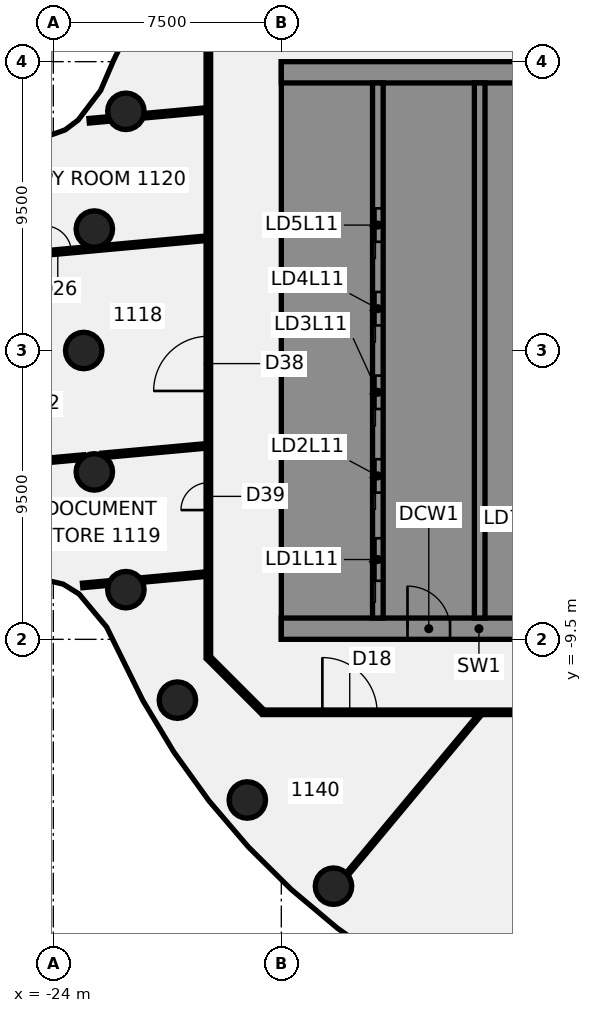
"""IFC4 building model, lengths in metres.
Left out: names, types, materials, properties, quantities, classifications, styles, units other than length and angle.
Written with IfcOpenShell. Run it as: python <this file> out.ifc"""

import sys

from ifc_helpers import new_model, si_unit, direction, frame, frame_2d, origin, origin_2d, place, context, subcontext, project, spatial, polyline, rectangle, circle, outline, extrude, element, fill, save


model = new_model("IFC4")
c1 = context("Model", 3, precision=1e-05, world=origin(), true_north=direction((0.0, 1.0)))
c2 = subcontext(c1, "Body", "Model", "MODEL_VIEW")
j1 = project(units=[si_unit("LENGTHUNIT", "METRE"), si_unit("PLANEANGLEUNIT", "RADIAN")], contexts=[c1])
p1 = place(None, origin())
s1 = spatial("IfcSite", under=j1, at=p1, CompositionType="ELEMENT")
p2 = place(p1, origin())
s2 = spatial("IfcBuilding", under=s1, at=p2, CompositionType="ELEMENT")
p3 = place(p2, frame((0.0, 0.0, 52.75)))
s3 = spatial("IfcBuildingStorey", under=s2, at=p3, CompositionType="ELEMENT", Elevation=52.75)
for number, where, z_axis, x_axis in (
    (1, (-21.613, 7.866, -0.14), (0.0, 0.0, 1.0), (1.0, 0.0, 0.0)),
    (2, (-22.651, 3.994, -0.14), (0.0, 0.0, 1.0), (1.0, 0.0, 0.0)),
    (3, (-23.0, 0.0, -0.14), (0.0, 0.0, 1.0), (1.0, 0.0, 0.0)),
    (4, (-22.651, -3.994, -0.14), (0.0, 0.0, 1.0), (1.0, 0.0, 0.0)),
    (5, (-21.613, -7.866, -0.14), (0.0, 0.0, 1.0), (1.0, 0.0, 0.0)),
    (6, (-19.919, -11.5, -0.14), (0.0, 0.0, 1.0), (1.0, 0.0, 0.0)),
    (7, (-17.619, -14.784, -0.14), (0.0, 0.0, 1.0), (1.0, 0.0, 0.0)),
    (8, (-14.784, -17.619, -0.14), (0.0, 0.0, 1.0), (1.0, 0.0, 0.0)),
):
    element("IfcColumn", number, at=place(p3, frame(where, z_axis=z_axis, x_axis=x_axis)), inside=s3, PredefinedType="COLUMN", context=c2, shape_type="SweptSolid", body=[
        extrude(circle(Radius=0.6, at=origin_2d()), origin(), (0.0, 0.0, 1.0), 3.75),
    ])
p4 = place(p3, frame((-18.872, -10.128, 0.0), z_axis=(0.0, 0.0, 1.0), x_axis=(0.707106781187, -0.707106781187, 0.0)))
e9 = element("IfcWall", 9, at=p4, inside=s3, PredefinedType="PARTITIONING", context=c2, shape_type="SweptSolid", body=[
    extrude(rectangle(XDim=2.465, YDim=0.15, at=frame_2d((1.232, 0.0))), origin(), (0.0, 0.0, 1.0), 3.01),
])
p5 = place(p3, frame((-17.1, -11.9, 0.0), z_axis=(0.0, 0.0, 1.0), x_axis=(1.0, 0.0, 0.0)))
e10 = element("IfcWall", 10, at=p5, inside=s3, PredefinedType="PARTITIONING", context=c2, shape_type="SweptSolid", body=[
    extrude(rectangle(XDim=34.165, YDim=0.15, at=frame_2d((17.083, 0.0))), origin(), (0.0, 0.0, 1.0), 3.01),
])
p6 = place(p5, frame((15.312, 0.0, 0.0)))
e11 = element("IfcOpeningElement", 11, at=p6, cuts=e10, PredefinedType="OPENING", context=c2, shape_type="SweptSolid", body=[
    extrude(rectangle(XDim=1.8, YDim=2.1, at=frame_2d((0.9, 1.05))), frame((0.0, 0.085, 0.0), z_axis=(0.0, -1.0, 0.0), x_axis=(1.0, 0.0, 0.0)), (0.0, 0.0, 1.0), 0.17),
])
p7 = place(p5, frame((1.95, 0.0, 0.0)))
e12 = element("IfcOpeningElement", 12, at=p7, cuts=e10, PredefinedType="OPENING", context=c2, shape_type="SweptSolid", body=[
    extrude(rectangle(XDim=1.8, YDim=2.1, at=frame_2d((0.9, 1.05))), frame((0.0, 0.085, 0.0), z_axis=(0.0, -1.0, 0.0), x_axis=(1.0, 0.0, 0.0)), (0.0, 0.0, 1.0), 0.17),
])
p8 = place(p5, frame((27.558, 0.0, 0.0)))
e13 = element("IfcOpeningElement", 13, at=p8, cuts=e10, PredefinedType="OPENING", context=c2, shape_type="SweptSolid", body=[
    extrude(rectangle(XDim=1.8, YDim=2.1, at=frame_2d((0.9, 1.05))), frame((0.0, 0.085, 0.0), z_axis=(0.0, -1.0, 0.0), x_axis=(1.0, 0.0, 0.0)), (0.0, 0.0, 1.0), 0.17),
])
p9 = place(p3, frame((-26.0, 3.049, 0.0), z_axis=(0.0, 0.0, 1.0), x_axis=(0.995841773556, 0.091099736772, 0.0)))
e14 = element("IfcWall", 14, at=p9, inside=s3, PredefinedType="PARTITIONING", context=c2, shape_type="SweptSolid", body=[
    extrude(rectangle(XDim=7.064, YDim=0.15, at=frame_2d((3.532, 0.0))), origin(), (0.0, 0.0, 1.0), 3.01),
])
p10 = place(p9, frame((1.705, 0.0, 0.0)))
e15 = element("IfcOpeningElement", 15, at=p10, cuts=e14, PredefinedType="OPENING", context=c2, shape_type="SweptSolid", body=[
    extrude(rectangle(XDim=0.9, YDim=2.1, at=frame_2d((0.45, 1.05))), frame((0.0, 0.085, 0.0), z_axis=(0.0, -1.0, 0.0), x_axis=(1.0, 0.0, 0.0)), (0.0, 0.0, 1.0), 0.17),
])
p11 = place(p3, frame((-25.38, -3.723, 0.0), z_axis=(0.0, 0.0, 1.0), x_axis=(0.995847961982, 0.091032063676, 0.0)))
e16 = element("IfcWall", 16, at=p11, inside=s3, PredefinedType="PARTITIONING", context=c2, shape_type="SweptSolid", body=[
    extrude(rectangle(XDim=2.395, YDim=0.15, at=frame_2d((1.198, 0.0))), origin(), (0.0, 0.0, 1.0), 3.01),
])
p12 = place(p3, frame((-22.4, -3.451, 0.0), z_axis=(0.0, 0.0, 1.0), x_axis=(0.995850755629, 0.091001497317, 0.0)))
e17 = element("IfcWall", 17, at=p12, inside=s3, PredefinedType="PARTITIONING", context=c2, shape_type="SweptSolid", body=[
    extrude(rectangle(XDim=3.45, YDim=0.15, at=frame_2d((1.725, 0.0))), origin(), (0.0, 0.0, 1.0), 3.01),
])
p13 = place(p3, frame((-23.036, -7.727, 0.0), z_axis=(0.0, 0.0, 1.0), x_axis=(0.995831241369, 0.091214794378, 0.0)))
e18 = element("IfcWall", 18, at=p13, inside=s3, PredefinedType="PARTITIONING", context=c2, shape_type="SweptSolid", body=[
    extrude(rectangle(XDim=0.875, YDim=0.15, at=frame_2d((0.438, 0.0))), origin(), (0.0, 0.0, 1.0), 3.01),
])
p14 = place(p3, frame((-21.097, -7.549, 0.0), z_axis=(0.0, 0.0, 1.0), x_axis=(0.995831293588, 0.091214224281, 0.0)))
e19 = element("IfcWall", 19, at=p14, inside=s3, PredefinedType="PARTITIONING", context=c2, shape_type="SweptSolid", body=[
    extrude(rectangle(XDim=2.141, YDim=0.15, at=frame_2d((1.071, 0.0))), origin(), (0.0, 0.0, 1.0), 3.01),
])
p15 = place(p3, frame((-22.822, 7.556, 0.0), z_axis=(0.0, 0.0, 1.0), x_axis=(0.995860226183, 0.090897799237, 0.0)))
e20 = element("IfcWall", 20, at=p15, inside=s3, PredefinedType="PARTITIONING", context=c2, shape_type="SweptSolid", body=[
    extrude(rectangle(XDim=0.669, YDim=0.15, at=frame_2d((0.334, 0.0))), origin(), (0.0, 0.0, 1.0), 3.01),
])
p16 = place(p3, frame((-21.042, 7.719, 0.0), z_axis=(0.0, 0.0, 1.0), x_axis=(0.995837392729, 0.091147612376, 0.0)))
e21 = element("IfcWall", 21, at=p16, inside=s3, PredefinedType="PARTITIONING", context=c2, shape_type="SweptSolid", body=[
    extrude(rectangle(XDim=2.087, YDim=0.15, at=frame_2d((1.043, 0.0))), origin(), (0.0, 0.0, 1.0), 3.01),
])
p17 = place(p3, frame((-14.342, -17.229, 0.0), z_axis=(0.0, 0.0, 1.0), x_axis=(0.639768706711, 0.768567499907, 0.0)))
e22 = element("IfcWall", 22, at=p17, inside=s3, PredefinedType="PARTITIONING", context=c2, shape_type="SweptSolid", body=[
    extrude(rectangle(XDim=6.818, YDim=0.1, at=frame_2d((3.409, 0.0))), origin(), (0.0, 0.0, 1.0), 3.01),
])
p18 = place(p3, frame((-18.9, -10.1, 0.0), z_axis=(0.0, 0.0, 1.0), x_axis=(0.0, 1.0, 0.0)))
e23 = element("IfcWall", 23, at=p18, inside=s3, PredefinedType="PARTITIONING", context=c2, shape_type="SweptSolid", body=[
    extrude(rectangle(XDim=20.2, YDim=0.15, at=frame_2d((10.1, 0.0))), origin(), (0.0, 0.0, 1.0), 3.01),
])
p19 = place(p18, frame((8.769, 0.0, 0.0)))
e24 = element("IfcOpeningElement", 24, at=p19, cuts=e23, PredefinedType="OPENING", context=c2, shape_type="SweptSolid", body=[
    extrude(rectangle(XDim=1.8, YDim=2.1, at=frame_2d((0.9, 1.05))), frame((0.0, 0.085, 0.0), z_axis=(0.0, -1.0, 0.0), x_axis=(1.0, 0.0, 0.0)), (0.0, 0.0, 1.0), 0.17),
])
p20 = place(p18, frame((4.852, 0.0, 0.0)))
e25 = element("IfcOpeningElement", 25, at=p20, cuts=e23, PredefinedType="OPENING", context=c2, shape_type="SweptSolid", body=[
    extrude(rectangle(XDim=0.9, YDim=2.1, at=frame_2d((0.45, 1.05))), frame((0.0, 0.085, 0.0), z_axis=(0.0, -1.0, 0.0), x_axis=(1.0, 0.0, 0.0)), (0.0, 0.0, 1.0), 0.17),
])
p21 = place(p3, frame((-16.5, -9.15, 0.0), z_axis=(0.0, 0.0, 1.0), x_axis=(1.0, 0.0, 0.0)))
e26 = element("IfcWall", 26, at=p21, inside=s3, PredefinedType="SHEAR", context=c2, shape_type="SweptSolid", body=[
    extrude(rectangle(XDim=13.0, YDim=0.7, at=frame_2d((6.5, 0.0))), origin(), (0.0, 0.0, 1.0), 3.61),
])
p22 = place(p21, frame((4.15, 0.0, 0.0)))
e27 = element("IfcOpeningElement", 27, at=p22, cuts=e26, PredefinedType="OPENING", context=c2, shape_type="SweptSolid", body=[
    extrude(rectangle(XDim=1.4, YDim=2.1, at=frame_2d((0.7, 1.05))), frame((0.0, 0.36, 0.0), z_axis=(0.0, -1.0, 0.0), x_axis=(1.0, 0.0, 0.0)), (0.0, 0.0, 1.0), 0.72),
])
p23 = place(p21, frame((10.125, 0.0, 0.0)))
e28 = element("IfcOpeningElement", 28, at=p23, cuts=e26, PredefinedType="OPENING", context=c2, shape_type="SweptSolid", body=[
    extrude(rectangle(XDim=1.4, YDim=2.1, at=frame_2d((0.7, 1.05))), frame((0.0, 0.36, 0.0), z_axis=(0.0, -1.0, 0.0), x_axis=(1.0, 0.0, 0.0)), (0.0, 0.0, 1.0), 0.72),
])
p24 = place(p3, origin())
e29 = element("IfcWall", 29, at=p24, inside=s3, PredefinedType="SHEAR", context=c2, shape_type="SweptSolid", body=[
    extrude(outline(polyline([(-13.5, -8.8), (-13.5, -8.125), (-15.8, -8.125), (-15.8, -5.625), (-13.5, -5.625), (-13.5, -5.375), (-15.8, -5.375), (-15.8, -2.875), (-13.5, -2.875), (-13.5, -2.625), (-15.8, -2.625), (-15.8, -0.125), (-13.5, -0.125), (-13.5, 0.125), (-15.8, 0.125), (-15.8, 2.625), (-13.5, 2.625), (-13.5, 2.875), (-15.8, 2.875), (-15.8, 5.375), (-13.5, 5.375), (-13.5, 5.625), (-15.8, 5.625), (-15.8, 8.125), (-13.5, 8.125), (-13.5, 8.8), (-15.8, 8.8), (-16.5, 8.8), (-16.5, -8.8), (-15.8, -8.8), (-13.5, -8.8)])), origin(), (0.0, 0.0, 1.0), 3.61),
])
p25 = place(p3, frame((-16.5, 9.15, 0.0), z_axis=(0.0, 0.0, 1.0), x_axis=(1.0, 0.0, 0.0)))
e30 = element("IfcWall", 30, at=p25, inside=s3, PredefinedType="SHEAR", context=c2, shape_type="SweptSolid", body=[
    extrude(rectangle(XDim=13.0, YDim=0.7, at=frame_2d((6.5, 0.0))), origin(), (0.0, 0.0, 1.0), 3.61),
])
p26 = place(p3, origin())
e31 = element("IfcWall", 31, at=p26, inside=s3, PredefinedType="SHEAR", context=c2, shape_type="SweptSolid", body=[
    extrude(outline(polyline([(-9.8, -5.375), (-9.8, -5.625), (-7.5, -5.625), (-7.15, -5.625), (-7.15, 8.8), (-7.5, 8.8), (-9.8, 8.8), (-9.8, 8.125), (-7.5, 8.125), (-7.5, 5.625), (-9.8, 5.625), (-9.8, 5.375), (-7.5, 5.375), (-7.5, 2.875), (-9.8, 2.875), (-9.8, 2.625), (-7.5, 2.625), (-7.5, 0.125), (-9.8, 0.125), (-9.8, -0.125), (-7.5, -0.125), (-7.5, -2.625), (-9.8, -2.625), (-9.8, -2.875), (-7.5, -2.875), (-7.5, -5.375), (-9.8, -5.375)])), origin(), (0.0, 0.0, 1.0), 3.61),
])
p27 = place(p3, origin())
e32 = element("IfcWall", 32, at=p27, inside=s3, PredefinedType="SHEAR", context=c2, shape_type="SweptSolid", body=[
    extrude(outline(polyline([(-7.5, -8.125), (-9.55, -8.125), (-9.55, -5.625), (-9.8, -5.625), (-9.8, -8.125), (-9.8, -8.8), (-7.5, -8.8), (-7.5, -8.125)])), origin(), (0.0, 0.0, 1.0), 3.61),
])
p28 = place(p3, frame((-13.325, -8.8, 0.0), z_axis=(0.0, 0.0, 1.0), x_axis=(0.0, 1.0, 0.0)))
e33 = element("IfcWall", 33, at=p28, inside=s3, PredefinedType="SHEAR", context=c2, shape_type="SweptSolid", body=[
    extrude(rectangle(XDim=17.6, YDim=0.35, at=frame_2d((8.8, 0.0))), origin(), (0.0, 0.0, 1.0), 3.61),
])
p29 = place(p28, frame((1.225, 0.0, 0.0)))
e34 = element("IfcOpeningElement", 34, at=p29, cuts=e33, PredefinedType="OPENING", context=c2, shape_type="SweptSolid", body=[
    extrude(rectangle(XDim=1.4, YDim=2.1, at=frame_2d((0.7, 1.05))), frame((0.0, 0.185, 0.0), z_axis=(0.0, -1.0, 0.0), x_axis=(1.0, 0.0, 0.0)), (0.0, 0.0, 1.0), 0.37),
])
p30 = place(p28, frame((4.125, 0.0, 0.0)))
e35 = element("IfcOpeningElement", 35, at=p30, cuts=e33, PredefinedType="OPENING", context=c2, shape_type="SweptSolid", body=[
    extrude(rectangle(XDim=1.1, YDim=2.1, at=frame_2d((0.55, 1.05))), frame((0.0, 0.185, 0.0), z_axis=(0.0, -1.0, 0.0), x_axis=(1.0, 0.0, 0.0)), (0.0, 0.0, 1.0), 0.37),
])
p31 = place(p28, frame((6.875, 0.0, 0.0)))
e36 = element("IfcOpeningElement", 36, at=p31, cuts=e33, PredefinedType="OPENING", context=c2, shape_type="SweptSolid", body=[
    extrude(rectangle(XDim=1.1, YDim=2.1, at=frame_2d((0.55, 1.05))), frame((0.0, 0.185, 0.0), z_axis=(0.0, -1.0, 0.0), x_axis=(1.0, 0.0, 0.0)), (0.0, 0.0, 1.0), 0.37),
])
p32 = place(p28, frame((9.625, 0.0, 0.0)))
e37 = element("IfcOpeningElement", 37, at=p32, cuts=e33, PredefinedType="OPENING", context=c2, shape_type="SweptSolid", body=[
    extrude(rectangle(XDim=1.1, YDim=2.1, at=frame_2d((0.55, 1.05))), frame((0.0, 0.185, 0.0), z_axis=(0.0, -1.0, 0.0), x_axis=(1.0, 0.0, 0.0)), (0.0, 0.0, 1.0), 0.37),
])
p33 = place(p28, frame((12.375, 0.0, 0.0)))
e38 = element("IfcOpeningElement", 38, at=p33, cuts=e33, PredefinedType="OPENING", context=c2, shape_type="SweptSolid", body=[
    extrude(rectangle(XDim=1.1, YDim=2.1, at=frame_2d((0.55, 1.05))), frame((0.0, 0.185, 0.0), z_axis=(0.0, -1.0, 0.0), x_axis=(1.0, 0.0, 0.0)), (0.0, 0.0, 1.0), 0.37),
])
p34 = place(p3, frame((-9.975, -8.8, 0.0), z_axis=(0.0, 0.0, 1.0), x_axis=(0.0, 1.0, 0.0)))
e39 = element("IfcWall", 39, at=p34, inside=s3, PredefinedType="SHEAR", context=c2, shape_type="SweptSolid", body=[
    extrude(rectangle(XDim=17.6, YDim=0.35, at=frame_2d((8.8, 0.0))), origin(), (0.0, 0.0, 1.0), 3.61),
])
p35 = place(p7, frame((1.8, 0.0, 0.0), z_axis=(0.0, 0.0, 1.0), x_axis=(-1.0, 0.0, 0.0)))
e40 = element("IfcDoor", 40, at=p35, inside=s3, OperationType="DOUBLE_DOOR_SINGLE_SWING", PredefinedType="DOOR", context=c2, shape_type="SweptSolid", body=[
    extrude(rectangle(XDim=1.8, YDim=2.1, at=frame_2d((0.9, 1.05))), frame((0.0, 0.025, 0.0), z_axis=(0.0, -1.0, 0.0), x_axis=(1.0, 0.0, 0.0)), (0.0, 0.0, 1.0), 0.05),
])
fill(e12, e40)
p36 = place(p10, origin())
e41 = element("IfcDoor", 41, at=p36, inside=s3, OperationType="SINGLE_SWING_RIGHT", PredefinedType="DOOR", context=c2, shape_type="SweptSolid", body=[
    extrude(rectangle(XDim=0.9, YDim=2.1, at=frame_2d((0.45, 1.05))), frame((0.0, 0.025, 0.0), z_axis=(0.0, -1.0, 0.0), x_axis=(1.0, 0.0, 0.0)), (0.0, 0.0, 1.0), 0.05),
])
fill(e15, e41)
p37 = place(p19, frame((1.8, 0.0, 0.0), z_axis=(0.0, 0.0, 1.0), x_axis=(-1.0, 0.0, 0.0)))
e42 = element("IfcDoor", 42, at=p37, inside=s3, OperationType="DOUBLE_DOOR_SINGLE_SWING", PredefinedType="DOOR", context=c2, shape_type="SweptSolid", body=[
    extrude(rectangle(XDim=1.8, YDim=2.1, at=frame_2d((0.9, 1.05))), frame((0.0, 0.025, 0.0), z_axis=(0.0, -1.0, 0.0), x_axis=(1.0, 0.0, 0.0)), (0.0, 0.0, 1.0), 0.05),
])
fill(e24, e42)
p38 = place(p20, origin())
e43 = element("IfcDoor", 43, at=p38, inside=s3, OperationType="SINGLE_SWING_RIGHT", PredefinedType="DOOR", context=c2, shape_type="SweptSolid", body=[
    extrude(rectangle(XDim=0.9, YDim=2.1, at=frame_2d((0.45, 1.05))), frame((0.0, 0.025, 0.0), z_axis=(0.0, -1.0, 0.0), x_axis=(1.0, 0.0, 0.0)), (0.0, 0.0, 1.0), 0.05),
])
fill(e25, e43)
p39 = place(p22, origin())
e44 = element("IfcDoor", 44, at=p39, inside=s3, OperationType="SINGLE_SWING_LEFT", PredefinedType="DOOR", context=c2, shape_type="SweptSolid", body=[
    extrude(rectangle(XDim=1.4, YDim=2.1, at=frame_2d((0.7, 1.05))), frame((0.0, 0.025, 0.0), z_axis=(0.0, -1.0, 0.0), x_axis=(1.0, 0.0, 0.0)), (0.0, 0.0, 1.0), 0.05),
])
fill(e27, e44)
p40 = place(p29, origin())
e45 = element("IfcDoor", 45, at=p40, inside=s3, OperationType="SLIDING_TO_LEFT", PredefinedType="DOOR", context=c2, shape_type="SweptSolid", body=[
    extrude(rectangle(XDim=1.4, YDim=2.1, at=frame_2d((0.7, 1.05))), frame((0.0, 0.025, 0.0), z_axis=(0.0, -1.0, 0.0), x_axis=(1.0, 0.0, 0.0)), (0.0, 0.0, 1.0), 0.05),
])
fill(e34, e45)
p41 = place(p30, origin())
e46 = element("IfcDoor", 46, at=p41, inside=s3, OperationType="SLIDING_TO_LEFT", PredefinedType="DOOR", context=c2, shape_type="SweptSolid", body=[
    extrude(rectangle(XDim=1.1, YDim=2.1, at=frame_2d((0.55, 1.05))), frame((0.0, 0.025, 0.0), z_axis=(0.0, -1.0, 0.0), x_axis=(1.0, 0.0, 0.0)), (0.0, 0.0, 1.0), 0.05),
])
fill(e35, e46)
p42 = place(p31, origin())
e47 = element("IfcDoor", 47, at=p42, inside=s3, OperationType="SLIDING_TO_LEFT", PredefinedType="DOOR", context=c2, shape_type="SweptSolid", body=[
    extrude(rectangle(XDim=1.1, YDim=2.1, at=frame_2d((0.55, 1.05))), frame((0.0, 0.025, 0.0), z_axis=(0.0, -1.0, 0.0), x_axis=(1.0, 0.0, 0.0)), (0.0, 0.0, 1.0), 0.05),
])
fill(e36, e47)
p43 = place(p32, origin())
e48 = element("IfcDoor", 48, at=p43, inside=s3, OperationType="SLIDING_TO_LEFT", PredefinedType="DOOR", context=c2, shape_type="SweptSolid", body=[
    extrude(rectangle(XDim=1.1, YDim=2.1, at=frame_2d((0.55, 1.05))), frame((0.0, 0.025, 0.0), z_axis=(0.0, -1.0, 0.0), x_axis=(1.0, 0.0, 0.0)), (0.0, 0.0, 1.0), 0.05),
])
fill(e37, e48)
p44 = place(p33, origin())
e49 = element("IfcDoor", 49, at=p44, inside=s3, OperationType="SLIDING_TO_LEFT", PredefinedType="DOOR", context=c2, shape_type="SweptSolid", body=[
    extrude(rectangle(XDim=1.1, YDim=2.1, at=frame_2d((0.55, 1.05))), frame((0.0, 0.025, 0.0), z_axis=(0.0, -1.0, 0.0), x_axis=(1.0, 0.0, 0.0)), (0.0, 0.0, 1.0), 0.05),
])
fill(e38, e49)
save(model, sys.argv[1])
